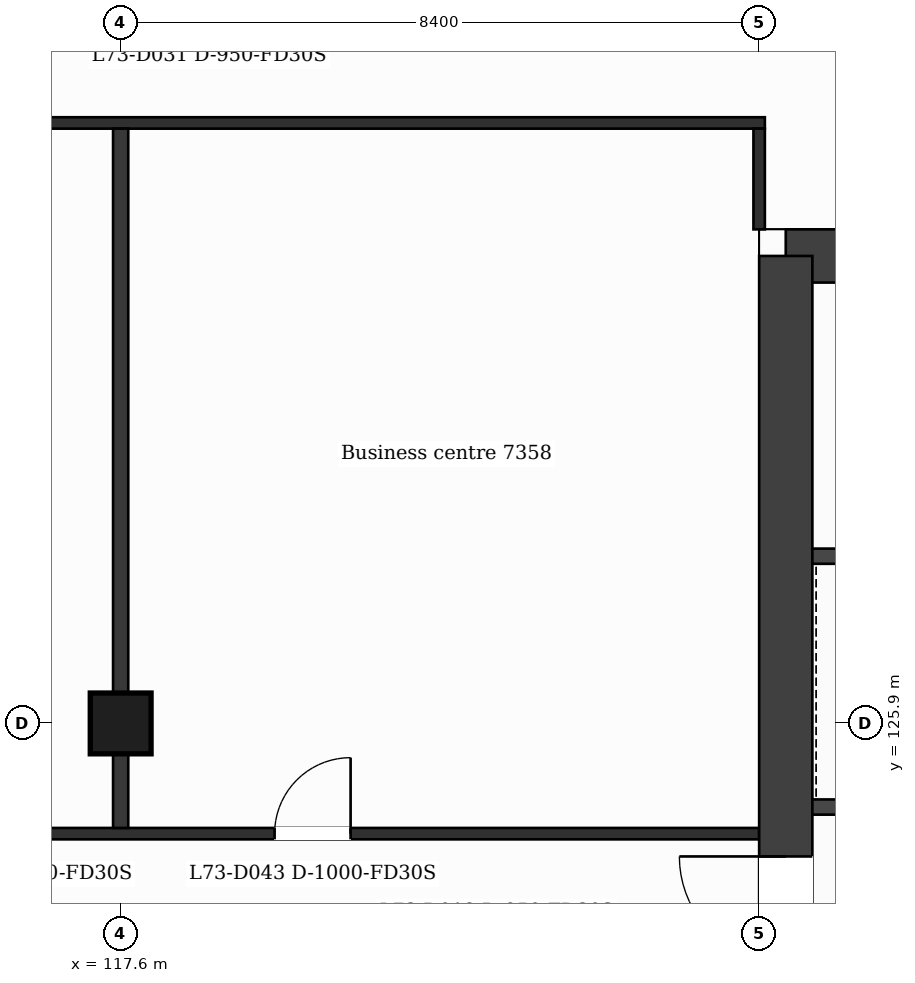
"""IFC4 building model, lengths in metres.
Left out: names, types, materials, properties, quantities, classifications, styles, units other than length and angle.
Written with IfcOpenShell. Run it as: python <this file> out.ifc"""

import sys

from ifc_helpers import new_model, si_unit, direction, frame, frame_2d, origin, origin_2d, place, context, subcontext, project, spatial, rectangle, extrude, element, fill, save


model = new_model("IFC4")
c1 = context("Model", 3, precision=1e-05, world=origin(), true_north=direction((0.0, 1.0)))
c2 = subcontext(c1, "Body", "Model", "MODEL_VIEW")
j1 = project(units=[si_unit("LENGTHUNIT", "METRE"), si_unit("PLANEANGLEUNIT", "RADIAN")], contexts=[c1])
p1 = place(None, origin())
s1 = spatial("IfcSite", under=j1, at=p1, CompositionType="ELEMENT")
p2 = place(p1, origin())
s2 = spatial("IfcBuilding", under=s1, at=p2, CompositionType="ELEMENT")
p3 = place(p2, frame((0.0, 0.0, 299.7)))
s3 = spatial("IfcBuildingStorey", under=s2, at=p3, CompositionType="ELEMENT", Elevation=299.7)
p4 = place(p3, frame((126.35, 132.05, 0.0), z_axis=(0.0, 0.0, 1.0), x_axis=(1.0, 0.0, 0.0)))
e1 = element("IfcWall", 1, at=p4, inside=s3, PredefinedType="SHEAR", context=c2, shape_type="SweptSolid", body=[
    extrude(rectangle(XDim=11.513, YDim=0.7, at=frame_2d((5.757, 0.0))), origin(), (0.0, 0.0, 1.0), 3.7),
])
p5 = place(p4, frame((3.386, 0.0, 0.0)))
e2 = element("IfcOpeningElement", 2, at=p5, cuts=e1, PredefinedType="OPENING", context=c2, shape_type="SweptSolid", body=[
    extrude(rectangle(XDim=1.2, YDim=2.1, at=frame_2d((0.6, 1.05))), frame((0.0, 0.36, 0.0), z_axis=(0.0, -1.0, 0.0), x_axis=(1.0, 0.0, 0.0)), (0.0, 0.0, 1.0), 0.72),
])
p6 = place(p3, frame((126.35, 116.35, 0.0), z_axis=(0.0, 0.0, 1.0), x_axis=(0.0, 1.0, 0.0)))
e3 = element("IfcWall", 3, at=p6, inside=s3, PredefinedType="SHEAR", context=c2, shape_type="SweptSolid", body=[
    extrude(rectangle(XDim=15.7, YDim=0.7, at=frame_2d((7.85, 0.0))), origin(), (0.0, 0.0, 1.0), 3.7),
])
p7 = place(p6, frame((6.4, 0.0, 0.0)))
e4 = element("IfcOpeningElement", 4, at=p7, cuts=e3, PredefinedType="OPENING", context=c2, shape_type="SweptSolid", body=[
    extrude(rectangle(XDim=1.4, YDim=2.1, at=frame_2d((0.7, 1.05))), frame((0.0, 0.36, 0.0), z_axis=(0.0, -1.0, 0.0), x_axis=(1.0, 0.0, 0.0)), (0.0, 0.0, 1.0), 0.72),
])
p8 = place(p3, frame((117.6, 125.9, 0.0), z_axis=(0.0, 0.0, 1.0), x_axis=(1.0, 0.0, 0.0)))
e5 = element("IfcColumn", 5, at=p8, inside=s3, PredefinedType="COLUMN", context=c2, shape_type="SweptSolid", body=[
    extrude(rectangle(XDim=0.8, YDim=0.8, at=origin_2d()), origin(), (0.0, 0.0, 1.0), 3.7),
])
p9 = place(p3, frame((100.8, 124.45, 0.0), z_axis=(0.0, 0.0, 1.0), x_axis=(1.0, 0.0, 0.0)))
e6 = element("IfcWall", 6, at=p9, inside=s3, PredefinedType="PARTITIONING", context=c2, shape_type="SweptSolid", body=[
    extrude(rectangle(XDim=25.2, YDim=0.15, at=frame_2d((12.6, 0.0))), origin(), (0.0, 0.0, 1.0), 3.25),
])
p10 = place(p9, frame((1.85, 0.0, 0.0)))
e7 = element("IfcOpeningElement", 7, at=p10, cuts=e6, PredefinedType="OPENING", context=c2, shape_type="SweptSolid", body=[
    extrude(rectangle(XDim=1.0, YDim=2.1, at=frame_2d((0.5, 1.05))), frame((0.0, 0.085, 0.0), z_axis=(0.0, -1.0, 0.0), x_axis=(1.0, 0.0, 0.0)), (0.0, 0.0, 1.0), 0.17),
])
p11 = place(p9, frame((6.425, 0.0, 0.0)))
e8 = element("IfcOpeningElement", 8, at=p11, cuts=e6, PredefinedType="OPENING", context=c2, shape_type="SweptSolid", body=[
    extrude(rectangle(XDim=1.0, YDim=2.1, at=frame_2d((0.5, 1.05))), frame((0.0, 0.085, 0.0), z_axis=(0.0, -1.0, 0.0), x_axis=(1.0, 0.0, 0.0)), (0.0, 0.0, 1.0), 0.17),
])
p12 = place(p9, frame((9.4, 0.0, 0.0)))
e9 = element("IfcOpeningElement", 9, at=p12, cuts=e6, PredefinedType="OPENING", context=c2, shape_type="SweptSolid", body=[
    extrude(rectangle(XDim=1.0, YDim=2.1, at=frame_2d((0.5, 1.05))), frame((0.0, 0.085, 0.0), z_axis=(0.0, -1.0, 0.0), x_axis=(1.0, 0.0, 0.0)), (0.0, 0.0, 1.0), 0.17),
])
p13 = place(p9, frame((14.825, 0.0, 0.0)))
e10 = element("IfcOpeningElement", 10, at=p13, cuts=e6, PredefinedType="OPENING", context=c2, shape_type="SweptSolid", body=[
    extrude(rectangle(XDim=1.0, YDim=2.1, at=frame_2d((0.5, 1.05))), frame((0.0, 0.085, 0.0), z_axis=(0.0, -1.0, 0.0), x_axis=(1.0, 0.0, 0.0)), (0.0, 0.0, 1.0), 0.17),
])
p14 = place(p9, frame((18.825, 0.0, 0.0)))
e11 = element("IfcOpeningElement", 11, at=p14, cuts=e6, PredefinedType="OPENING", context=c2, shape_type="SweptSolid", body=[
    extrude(rectangle(XDim=1.0, YDim=2.1, at=frame_2d((0.5, 1.05))), frame((0.0, 0.085, 0.0), z_axis=(0.0, -1.0, 0.0), x_axis=(1.0, 0.0, 0.0)), (0.0, 0.0, 1.0), 0.17),
])
p15 = place(p3, frame((126.7, 124.8, 0.0), z_axis=(0.0, 0.0, 1.0), x_axis=(1.0, 0.0, 0.0)))
e12 = element("IfcWall", 12, at=p15, inside=s3, PredefinedType="PARTITIONING", context=c2, shape_type="SweptSolid", body=[
    extrude(rectangle(XDim=4.849, YDim=0.2, at=frame_2d((2.424, 0.0))), origin(), (0.0, 0.0, 1.0), 3.25),
])
p16 = place(p15, frame((0.818, 0.0, 0.0)))
e13 = element("IfcOpeningElement", 13, at=p16, cuts=e12, PredefinedType="OPENING", context=c2, shape_type="SweptSolid", body=[
    extrude(rectangle(XDim=1.1, YDim=2.1, at=frame_2d((0.55, 1.05))), frame((0.0, 0.11, 0.0), z_axis=(0.0, -1.0, 0.0), x_axis=(1.0, 0.0, 0.0)), (0.0, 0.0, 1.0), 0.22),
])
p17 = place(p3, frame((126.7, 128.1, 0.0), z_axis=(0.0, 0.0, 1.0), x_axis=(1.0, 0.0, 0.0)))
e14 = element("IfcWall", 14, at=p17, inside=s3, PredefinedType="PARTITIONING", context=c2, shape_type="SweptSolid", body=[
    extrude(rectangle(XDim=4.849, YDim=0.2, at=frame_2d((2.424, 0.0))), origin(), (0.0, 0.0, 1.0), 3.25),
])
p18 = place(p17, frame((3.149, 0.0, 0.0)))
e15 = element("IfcOpeningElement", 15, at=p18, cuts=e14, PredefinedType="OPENING", context=c2, shape_type="SweptSolid", body=[
    extrude(rectangle(XDim=1.1, YDim=2.1, at=frame_2d((0.55, 1.05))), frame((0.0, 0.11, 0.0), z_axis=(0.0, -1.0, 0.0), x_axis=(1.0, 0.0, 0.0)), (0.0, 0.0, 1.0), 0.22),
])
p19 = place(p3, frame((100.725, 133.8, 0.0), z_axis=(0.0, 0.0, 1.0), x_axis=(1.0, 0.0, 0.0)))
e16 = element("IfcWall", 16, at=p19, inside=s3, PredefinedType="PARTITIONING", context=c2, shape_type="SweptSolid", body=[
    extrude(rectangle(XDim=25.35, YDim=0.15, at=frame_2d((12.675, 0.0))), origin(), (0.0, 0.0, 1.0), 3.25),
])
p20 = place(p19, frame((9.825, 0.0, 0.0)))
e17 = element("IfcOpeningElement", 17, at=p20, cuts=e16, PredefinedType="OPENING", context=c2, shape_type="SweptSolid", body=[
    extrude(rectangle(XDim=1.0, YDim=2.1, at=frame_2d((0.5, 1.05))), frame((0.0, 0.085, 0.0), z_axis=(0.0, -1.0, 0.0), x_axis=(1.0, 0.0, 0.0)), (0.0, 0.0, 1.0), 0.17),
])
p21 = place(p3, frame((117.6, 124.525, 0.0), z_axis=(0.0, 0.0, 1.0), x_axis=(0.0, 1.0, 0.0)))
e18 = element("IfcWall", 18, at=p21, inside=s3, PredefinedType="PARTITIONING", context=c2, shape_type="SweptSolid", body=[
    extrude(rectangle(XDim=9.2, YDim=0.2, at=frame_2d((4.6, 0.0))), origin(), (0.0, 0.0, 1.0), 3.25),
])
p22 = place(p3, frame((126.0, 132.4, 0.0), z_axis=(0.0, 0.0, 1.0), x_axis=(0.0, 1.0, 0.0)))
e19 = element("IfcWall", 19, at=p22, inside=s3, PredefinedType="PARTITIONING", context=c2, shape_type="SweptSolid", body=[
    extrude(rectangle(XDim=1.325, YDim=0.15, at=frame_2d((0.663, 0.0))), origin(), (0.0, 0.0, 1.0), 3.25),
])
p23 = place(p14, origin())
e20 = element("IfcDoor", 20, at=p23, inside=s3, OperationType="SINGLE_SWING_RIGHT", PredefinedType="DOOR", context=c2, shape_type="SweptSolid", body=[
    extrude(rectangle(XDim=1.0, YDim=2.1, at=frame_2d((0.5, 1.05))), frame((0.0, 0.025, 0.0), z_axis=(0.0, -1.0, 0.0), x_axis=(1.0, 0.0, 0.0)), (0.0, 0.0, 1.0), 0.05),
])
fill(e11, e20)
p24 = place(p7, origin())
e21 = element("IfcDoor", 21, at=p24, inside=s3, OperationType="SINGLE_SWING_RIGHT", PredefinedType="DOOR", context=c2, shape_type="SweptSolid", body=[
    extrude(rectangle(XDim=1.4, YDim=2.1, at=frame_2d((0.7, 1.05))), frame((0.0, 0.025, 0.0), z_axis=(0.0, -1.0, 0.0), x_axis=(1.0, 0.0, 0.0)), (0.0, 0.0, 1.0), 0.05),
])
fill(e4, e21)
save(model, sys.argv[1])
